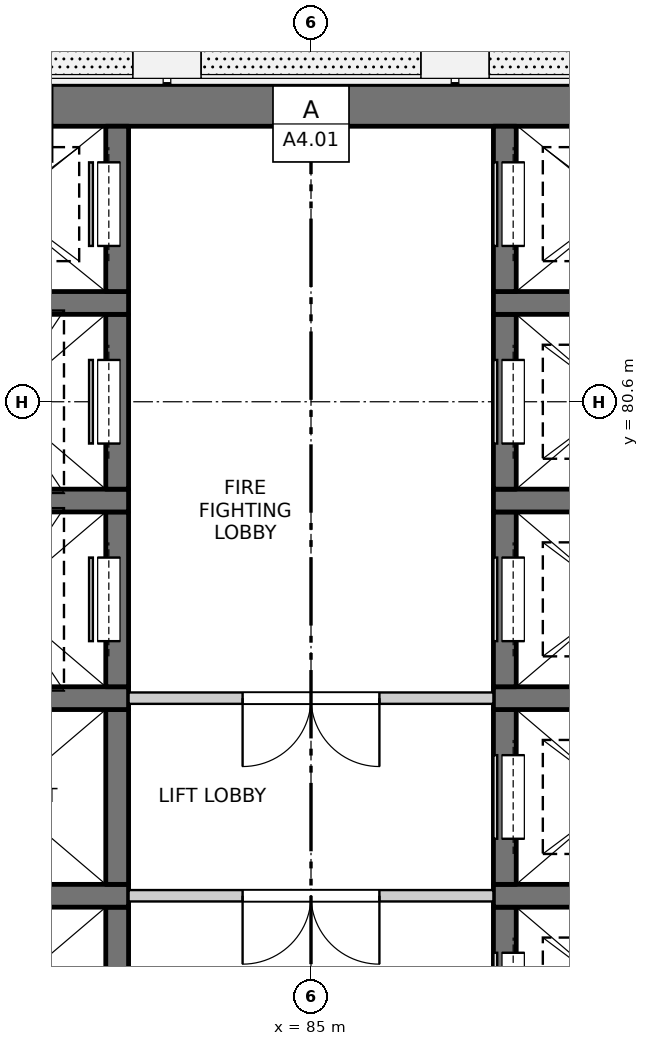
"""IFC4 building model, lengths in metres.
Left out: names, types, materials, properties, quantities, classifications, styles, units other than length and angle.
Written with IfcOpenShell. Run it as: python <this file> out.ifc"""

import sys

from ifc_helpers import new_model, si_unit, direction, frame, frame_2d, origin, place, context, subcontext, project, spatial, rectangle, extrude, element, fill, save


model = new_model("IFC4")
c1 = context("Model", 3, precision=1e-05, world=origin(), true_north=direction((0.0, 1.0)))
c2 = subcontext(c1, "Body", "Model", "MODEL_VIEW")
j1 = project(units=[si_unit("LENGTHUNIT", "METRE"), si_unit("PLANEANGLEUNIT", "RADIAN")], contexts=[c1])
p1 = place(None, origin())
s1 = spatial("IfcSite", under=j1, at=p1, CompositionType="ELEMENT")
p2 = place(p1, origin())
s2 = spatial("IfcBuilding", under=s1, at=p2, CompositionType="ELEMENT")
p3 = place(p2, frame((0.0, 0.0, 137.3)))
s3 = spatial("IfcBuildingStorey", under=s2, at=p3, CompositionType="ELEMENT", Elevation=137.3)
p4 = place(p3, frame((75.525, 84.5, -0.25), z_axis=(0.0, 0.0, 1.0), x_axis=(1.0, 0.0, 0.0)))
e1 = element("IfcWall", 1, at=p4, inside=s3, PredefinedType="SOLIDWALL", context=c2, shape_type="SweptSolid", body=[
    extrude(rectangle(XDim=18.95, YDim=0.55, at=frame_2d((9.475, 0.0))), origin(), (0.0, 0.0, 1.0), 3.4),
])
p5 = place(p3, frame((82.45, 71.65, -0.25), z_axis=(0.0, 0.0, 1.0), x_axis=(0.0, 1.0, 0.0)))
e2 = element("IfcWall", 2, at=p5, inside=s3, PredefinedType="SOLIDWALL", context=c2, shape_type="SweptSolid", body=[
    extrude(rectangle(XDim=2.3, YDim=0.3, at=frame_2d((1.15, 0.0))), origin(), (0.0, 0.0, 1.0), 3.4),
])
p6 = place(p3, frame((79.6, 74.1, -0.25), z_axis=(0.0, 0.0, 1.0), x_axis=(1.0, 0.0, 0.0)))
e3 = element("IfcWall", 3, at=p6, inside=s3, PredefinedType="SOLIDWALL", context=c2, shape_type="SweptSolid", body=[
    extrude(rectangle(XDim=3.0, YDim=0.3, at=frame_2d((1.5, 0.0))), origin(), (0.0, 0.0, 1.0), 3.4),
])
p7 = place(p3, frame((82.45, 74.25, -0.25), z_axis=(0.0, 0.0, 1.0), x_axis=(0.0, 1.0, 0.0)))
e4 = element("IfcWall", 4, at=p7, inside=s3, PredefinedType="SOLIDWALL", context=c2, shape_type="SweptSolid", body=[
    extrude(rectangle(XDim=2.3, YDim=0.3, at=frame_2d((1.15, 0.0))), origin(), (0.0, 0.0, 1.0), 3.4),
])
p8 = place(p3, frame((79.6, 76.7, -0.25), z_axis=(0.0, 0.0, 1.0), x_axis=(1.0, 0.0, 0.0)))
e5 = element("IfcWall", 5, at=p8, inside=s3, PredefinedType="SOLIDWALL", context=c2, shape_type="SweptSolid", body=[
    extrude(rectangle(XDim=3.0, YDim=0.3, at=frame_2d((1.5, 0.0))), origin(), (0.0, 0.0, 1.0), 3.4),
])
p9 = place(p3, frame((82.45, 76.85, -0.25), z_axis=(0.0, 0.0, 1.0), x_axis=(0.0, 1.0, 0.0)))
e6 = element("IfcWall", 6, at=p9, inside=s3, PredefinedType="SOLIDWALL", context=c2, shape_type="SweptSolid", body=[
    extrude(rectangle(XDim=2.3, YDim=0.3, at=frame_2d((1.15, 0.0))), origin(), (0.0, 0.0, 1.0), 3.4),
])
p10 = place(p9, frame((0.6, 0.0, 0.25)))
e7 = element("IfcOpeningElement", 7, at=p10, cuts=e6, PredefinedType="OPENING", context=c2, shape_type="SweptSolid", body=[
    extrude(rectangle(XDim=1.1, YDim=2.1, at=frame_2d((0.55, 1.05))), frame((0.0, 0.16, 0.0), z_axis=(0.0, -1.0, 0.0), x_axis=(1.0, 0.0, 0.0)), (0.0, 0.0, 1.0), 0.32),
])
p11 = place(p3, frame((79.6, 79.3, -0.25), z_axis=(0.0, 0.0, 1.0), x_axis=(1.0, 0.0, 0.0)))
e8 = element("IfcWall", 8, at=p11, inside=s3, PredefinedType="SOLIDWALL", context=c2, shape_type="SweptSolid", body=[
    extrude(rectangle(XDim=3.0, YDim=0.3, at=frame_2d((1.5, 0.0))), origin(), (0.0, 0.0, 1.0), 3.4),
])
p12 = place(p3, frame((82.45, 79.45, -0.25), z_axis=(0.0, 0.0, 1.0), x_axis=(0.0, 1.0, 0.0)))
e9 = element("IfcWall", 9, at=p12, inside=s3, PredefinedType="SOLIDWALL", context=c2, shape_type="SweptSolid", body=[
    extrude(rectangle(XDim=2.3, YDim=0.3, at=frame_2d((1.15, 0.0))), origin(), (0.0, 0.0, 1.0), 3.4),
])
p13 = place(p12, frame((0.6, 0.0, 0.25)))
e10 = element("IfcOpeningElement", 10, at=p13, cuts=e9, PredefinedType="OPENING", context=c2, shape_type="SweptSolid", body=[
    extrude(rectangle(XDim=1.1, YDim=2.1, at=frame_2d((0.55, 1.05))), frame((0.0, 0.16, 0.0), z_axis=(0.0, -1.0, 0.0), x_axis=(1.0, 0.0, 0.0)), (0.0, 0.0, 1.0), 0.32),
])
p14 = place(p3, frame((79.6, 81.9, -0.25), z_axis=(0.0, 0.0, 1.0), x_axis=(1.0, 0.0, 0.0)))
e11 = element("IfcWall", 11, at=p14, inside=s3, PredefinedType="SOLIDWALL", context=c2, shape_type="SweptSolid", body=[
    extrude(rectangle(XDim=3.0, YDim=0.3, at=frame_2d((1.5, 0.0))), origin(), (0.0, 0.0, 1.0), 3.4),
])
p15 = place(p3, frame((82.45, 82.05, -0.25), z_axis=(0.0, 0.0, 1.0), x_axis=(0.0, 1.0, 0.0)))
e12 = element("IfcWall", 12, at=p15, inside=s3, PredefinedType="SOLIDWALL", context=c2, shape_type="SweptSolid", body=[
    extrude(rectangle(XDim=2.175, YDim=0.3, at=frame_2d((1.087, 0.0))), origin(), (0.0, 0.0, 1.0), 3.4),
])
p16 = place(p15, frame((0.6, 0.0, 0.25)))
e13 = element("IfcOpeningElement", 13, at=p16, cuts=e12, PredefinedType="OPENING", context=c2, shape_type="SweptSolid", body=[
    extrude(rectangle(XDim=1.1, YDim=2.1, at=frame_2d((0.55, 1.05))), frame((0.0, 0.16, 0.0), z_axis=(0.0, -1.0, 0.0), x_axis=(1.0, 0.0, 0.0)), (0.0, 0.0, 1.0), 0.32),
])
p17 = place(p3, frame((87.55, 71.65, -0.25), z_axis=(0.0, 0.0, 1.0), x_axis=(0.0, 1.0, 0.0)))
e14 = element("IfcWall", 14, at=p17, inside=s3, PredefinedType="SOLIDWALL", context=c2, shape_type="SweptSolid", body=[
    extrude(rectangle(XDim=2.3, YDim=0.3, at=frame_2d((1.15, 0.0))), origin(), (0.0, 0.0, 1.0), 3.4),
])
p18 = place(p17, frame((0.6, 0.0, 0.25)))
e15 = element("IfcOpeningElement", 15, at=p18, cuts=e14, PredefinedType="OPENING", context=c2, shape_type="SweptSolid", body=[
    extrude(rectangle(XDim=1.1, YDim=2.1, at=frame_2d((0.55, 1.05))), frame((0.0, 0.16, 0.0), z_axis=(0.0, -1.0, 0.0), x_axis=(1.0, 0.0, 0.0)), (0.0, 0.0, 1.0), 0.32),
])
p19 = place(p3, frame((87.4, 74.1, -0.25), z_axis=(0.0, 0.0, 1.0), x_axis=(1.0, 0.0, 0.0)))
e16 = element("IfcWall", 16, at=p19, inside=s3, PredefinedType="SOLIDWALL", context=c2, shape_type="SweptSolid", body=[
    extrude(rectangle(XDim=3.0, YDim=0.3, at=frame_2d((1.5, 0.0))), origin(), (0.0, 0.0, 1.0), 3.4),
])
p20 = place(p3, frame((87.55, 74.25, -0.25), z_axis=(0.0, 0.0, 1.0), x_axis=(0.0, 1.0, 0.0)))
e17 = element("IfcWall", 17, at=p20, inside=s3, PredefinedType="SOLIDWALL", context=c2, shape_type="SweptSolid", body=[
    extrude(rectangle(XDim=2.3, YDim=0.3, at=frame_2d((1.15, 0.0))), origin(), (0.0, 0.0, 1.0), 3.4),
])
p21 = place(p20, frame((0.6, 0.0, 0.25)))
e18 = element("IfcOpeningElement", 18, at=p21, cuts=e17, PredefinedType="OPENING", context=c2, shape_type="SweptSolid", body=[
    extrude(rectangle(XDim=1.1, YDim=2.1, at=frame_2d((0.55, 1.05))), frame((0.0, 0.16, 0.0), z_axis=(0.0, -1.0, 0.0), x_axis=(1.0, 0.0, 0.0)), (0.0, 0.0, 1.0), 0.32),
])
p22 = place(p3, frame((87.4, 76.7, -0.25), z_axis=(0.0, 0.0, 1.0), x_axis=(1.0, 0.0, 0.0)))
e19 = element("IfcWall", 19, at=p22, inside=s3, PredefinedType="SOLIDWALL", context=c2, shape_type="SweptSolid", body=[
    extrude(rectangle(XDim=3.0, YDim=0.3, at=frame_2d((1.5, 0.0))), origin(), (0.0, 0.0, 1.0), 3.4),
])
p23 = place(p3, frame((87.55, 76.85, -0.25), z_axis=(0.0, 0.0, 1.0), x_axis=(0.0, 1.0, 0.0)))
e20 = element("IfcWall", 20, at=p23, inside=s3, PredefinedType="SOLIDWALL", context=c2, shape_type="SweptSolid", body=[
    extrude(rectangle(XDim=2.3, YDim=0.3, at=frame_2d((1.15, 0.0))), origin(), (0.0, 0.0, 1.0), 3.4),
])
p24 = place(p23, frame((0.6, 0.0, 0.25)))
e21 = element("IfcOpeningElement", 21, at=p24, cuts=e20, PredefinedType="OPENING", context=c2, shape_type="SweptSolid", body=[
    extrude(rectangle(XDim=1.1, YDim=2.1, at=frame_2d((0.55, 1.05))), frame((0.0, 0.16, 0.0), z_axis=(0.0, -1.0, 0.0), x_axis=(1.0, 0.0, 0.0)), (0.0, 0.0, 1.0), 0.32),
])
p25 = place(p3, frame((87.4, 79.3, -0.25), z_axis=(0.0, 0.0, 1.0), x_axis=(1.0, 0.0, 0.0)))
e22 = element("IfcWall", 22, at=p25, inside=s3, PredefinedType="SOLIDWALL", context=c2, shape_type="SweptSolid", body=[
    extrude(rectangle(XDim=3.0, YDim=0.3, at=frame_2d((1.5, 0.0))), origin(), (0.0, 0.0, 1.0), 3.4),
])
p26 = place(p3, frame((87.55, 79.45, -0.25), z_axis=(0.0, 0.0, 1.0), x_axis=(0.0, 1.0, 0.0)))
e23 = element("IfcWall", 23, at=p26, inside=s3, PredefinedType="SOLIDWALL", context=c2, shape_type="SweptSolid", body=[
    extrude(rectangle(XDim=2.3, YDim=0.3, at=frame_2d((1.15, 0.0))), origin(), (0.0, 0.0, 1.0), 3.4),
])
p27 = place(p26, frame((0.6, 0.0, 0.25)))
e24 = element("IfcOpeningElement", 24, at=p27, cuts=e23, PredefinedType="OPENING", context=c2, shape_type="SweptSolid", body=[
    extrude(rectangle(XDim=1.1, YDim=2.1, at=frame_2d((0.55, 1.05))), frame((0.0, 0.16, 0.0), z_axis=(0.0, -1.0, 0.0), x_axis=(1.0, 0.0, 0.0)), (0.0, 0.0, 1.0), 0.32),
])
p28 = place(p3, frame((87.4, 81.9, -0.25), z_axis=(0.0, 0.0, 1.0), x_axis=(1.0, 0.0, 0.0)))
e25 = element("IfcWall", 25, at=p28, inside=s3, PredefinedType="SOLIDWALL", context=c2, shape_type="SweptSolid", body=[
    extrude(rectangle(XDim=3.0, YDim=0.3, at=frame_2d((1.5, 0.0))), origin(), (0.0, 0.0, 1.0), 3.4),
])
p29 = place(p3, frame((87.55, 82.05, -0.25), z_axis=(0.0, 0.0, 1.0), x_axis=(0.0, 1.0, 0.0)))
e26 = element("IfcWall", 26, at=p29, inside=s3, PredefinedType="SOLIDWALL", context=c2, shape_type="SweptSolid", body=[
    extrude(rectangle(XDim=2.175, YDim=0.3, at=frame_2d((1.087, 0.0))), origin(), (0.0, 0.0, 1.0), 3.4),
])
p30 = place(p29, frame((0.6, 0.0, 0.25)))
e27 = element("IfcOpeningElement", 27, at=p30, cuts=e26, PredefinedType="OPENING", context=c2, shape_type="SweptSolid", body=[
    extrude(rectangle(XDim=1.1, YDim=2.1, at=frame_2d((0.55, 1.05))), frame((0.0, 0.16, 0.0), z_axis=(0.0, -1.0, 0.0), x_axis=(1.0, 0.0, 0.0)), (0.0, 0.0, 1.0), 0.32),
])
p31 = place(p3, frame((82.6, 74.1, 0.0), z_axis=(0.0, 0.0, 1.0), x_axis=(1.0, 0.0, 0.0)))
e28 = element("IfcWall", 28, at=p31, inside=s3, PredefinedType="PARTITIONING", context=c2, shape_type="SweptSolid", body=[
    extrude(rectangle(XDim=4.8, YDim=0.15, at=frame_2d((2.4, 0.0))), origin(), (0.0, 0.0, 1.0), 3.15),
])
p32 = place(p31, frame((1.5, 0.0, 0.0)))
e29 = element("IfcOpeningElement", 29, at=p32, cuts=e28, PredefinedType="OPENING", context=c2, shape_type="SweptSolid", body=[
    extrude(rectangle(XDim=1.8, YDim=2.1, at=frame_2d((0.9, 1.05))), frame((0.0, 0.085, 0.0), z_axis=(0.0, -1.0, 0.0), x_axis=(1.0, 0.0, 0.0)), (0.0, 0.0, 1.0), 0.17),
])
p33 = place(p3, frame((82.6, 76.7, 0.0), z_axis=(0.0, 0.0, 1.0), x_axis=(1.0, 0.0, 0.0)))
e30 = element("IfcWall", 30, at=p33, inside=s3, PredefinedType="PARTITIONING", context=c2, shape_type="SweptSolid", body=[
    extrude(rectangle(XDim=4.8, YDim=0.15, at=frame_2d((2.4, 0.0))), origin(), (0.0, 0.0, 1.0), 3.15),
])
p34 = place(p33, frame((1.5, 0.0, 0.0)))
e31 = element("IfcOpeningElement", 31, at=p34, cuts=e30, PredefinedType="OPENING", context=c2, shape_type="SweptSolid", body=[
    extrude(rectangle(XDim=1.8, YDim=2.1, at=frame_2d((0.9, 1.05))), frame((0.0, 0.085, 0.0), z_axis=(0.0, -1.0, 0.0), x_axis=(1.0, 0.0, 0.0)), (0.0, 0.0, 1.0), 0.17),
])
p35 = place(p18, origin())
e32 = element("IfcDoor", 32, at=p35, inside=s3, OperationType="SLIDING_TO_LEFT", PredefinedType="DOOR", context=c2, shape_type="SweptSolid", body=[
    extrude(rectangle(XDim=1.1, YDim=2.1, at=frame_2d((0.55, 1.05))), frame((0.0, -0.085, 0.0), z_axis=(0.0, -1.0, 0.0), x_axis=(1.0, 0.0, 0.0)), (0.0, 0.0, 1.0), 0.05),
])
fill(e15, e32)
p36 = place(p32, origin())
e33 = element("IfcDoor", 33, at=p36, inside=s3, OperationType="DOUBLE_DOOR_SINGLE_SWING", PredefinedType="DOOR", context=c2, shape_type="SweptSolid", body=[
    extrude(rectangle(XDim=1.8, YDim=2.1, at=frame_2d((0.9, 1.05))), frame((0.0, 0.025, 0.0), z_axis=(0.0, -1.0, 0.0), x_axis=(1.0, 0.0, 0.0)), (0.0, 0.0, 1.0), 0.05),
])
fill(e29, e33)
p37 = place(p21, origin())
e34 = element("IfcDoor", 34, at=p37, inside=s3, OperationType="SLIDING_TO_LEFT", PredefinedType="DOOR", context=c2, shape_type="SweptSolid", body=[
    extrude(rectangle(XDim=1.1, YDim=2.1, at=frame_2d((0.55, 1.05))), frame((0.0, -0.085, 0.0), z_axis=(0.0, -1.0, 0.0), x_axis=(1.0, 0.0, 0.0)), (0.0, 0.0, 1.0), 0.05),
])
fill(e18, e34)
p38 = place(p34, origin())
e35 = element("IfcDoor", 35, at=p38, inside=s3, OperationType="DOUBLE_DOOR_SINGLE_SWING", PredefinedType="DOOR", context=c2, shape_type="SweptSolid", body=[
    extrude(rectangle(XDim=1.8, YDim=2.1, at=frame_2d((0.9, 1.05))), frame((0.0, 0.025, 0.0), z_axis=(0.0, -1.0, 0.0), x_axis=(1.0, 0.0, 0.0)), (0.0, 0.0, 1.0), 0.05),
])
fill(e31, e35)
p39 = place(p10, origin())
e36 = element("IfcDoor", 36, at=p39, inside=s3, OperationType="SLIDING_TO_LEFT", PredefinedType="DOOR", context=c2, shape_type="SweptSolid", body=[
    extrude(rectangle(XDim=1.1, YDim=2.1, at=frame_2d((0.55, 1.05))), frame((0.0, 0.135, 0.0), z_axis=(0.0, -1.0, 0.0), x_axis=(1.0, 0.0, 0.0)), (0.0, 0.0, 1.0), 0.05),
])
fill(e7, e36)
p40 = place(p24, origin())
e37 = element("IfcDoor", 37, at=p40, inside=s3, OperationType="SLIDING_TO_LEFT", PredefinedType="DOOR", context=c2, shape_type="SweptSolid", body=[
    extrude(rectangle(XDim=1.1, YDim=2.1, at=frame_2d((0.55, 1.05))), frame((0.0, -0.085, 0.0), z_axis=(0.0, -1.0, 0.0), x_axis=(1.0, 0.0, 0.0)), (0.0, 0.0, 1.0), 0.05),
])
fill(e21, e37)
p41 = place(p13, origin())
e38 = element("IfcDoor", 38, at=p41, inside=s3, OperationType="SLIDING_TO_LEFT", PredefinedType="DOOR", context=c2, shape_type="SweptSolid", body=[
    extrude(rectangle(XDim=1.1, YDim=2.1, at=frame_2d((0.55, 1.05))), frame((0.0, 0.135, 0.0), z_axis=(0.0, -1.0, 0.0), x_axis=(1.0, 0.0, 0.0)), (0.0, 0.0, 1.0), 0.05),
])
fill(e10, e38)
p42 = place(p27, origin())
e39 = element("IfcDoor", 39, at=p42, inside=s3, OperationType="SLIDING_TO_RIGHT", PredefinedType="DOOR", context=c2, shape_type="SweptSolid", body=[
    extrude(rectangle(XDim=1.1, YDim=2.1, at=frame_2d((0.55, 1.05))), frame((0.0, -0.085, 0.0), z_axis=(0.0, -1.0, 0.0), x_axis=(1.0, 0.0, 0.0)), (0.0, 0.0, 1.0), 0.05),
])
fill(e24, e39)
p43 = place(p16, origin())
e40 = element("IfcDoor", 40, at=p43, inside=s3, OperationType="SLIDING_TO_RIGHT", PredefinedType="DOOR", context=c2, shape_type="SweptSolid", body=[
    extrude(rectangle(XDim=1.1, YDim=2.1, at=frame_2d((0.55, 1.05))), frame((0.0, 0.135, 0.0), z_axis=(0.0, -1.0, 0.0), x_axis=(1.0, 0.0, 0.0)), (0.0, 0.0, 1.0), 0.05),
])
fill(e13, e40)
p44 = place(p30, origin())
e41 = element("IfcDoor", 41, at=p44, inside=s3, OperationType="SLIDING_TO_RIGHT", PredefinedType="DOOR", context=c2, shape_type="SweptSolid", body=[
    extrude(rectangle(XDim=1.1, YDim=2.1, at=frame_2d((0.55, 1.05))), frame((0.0, -0.085, 0.0), z_axis=(0.0, -1.0, 0.0), x_axis=(1.0, 0.0, 0.0)), (0.0, 0.0, 1.0), 0.05),
])
fill(e27, e41)
save(model, sys.argv[1])
